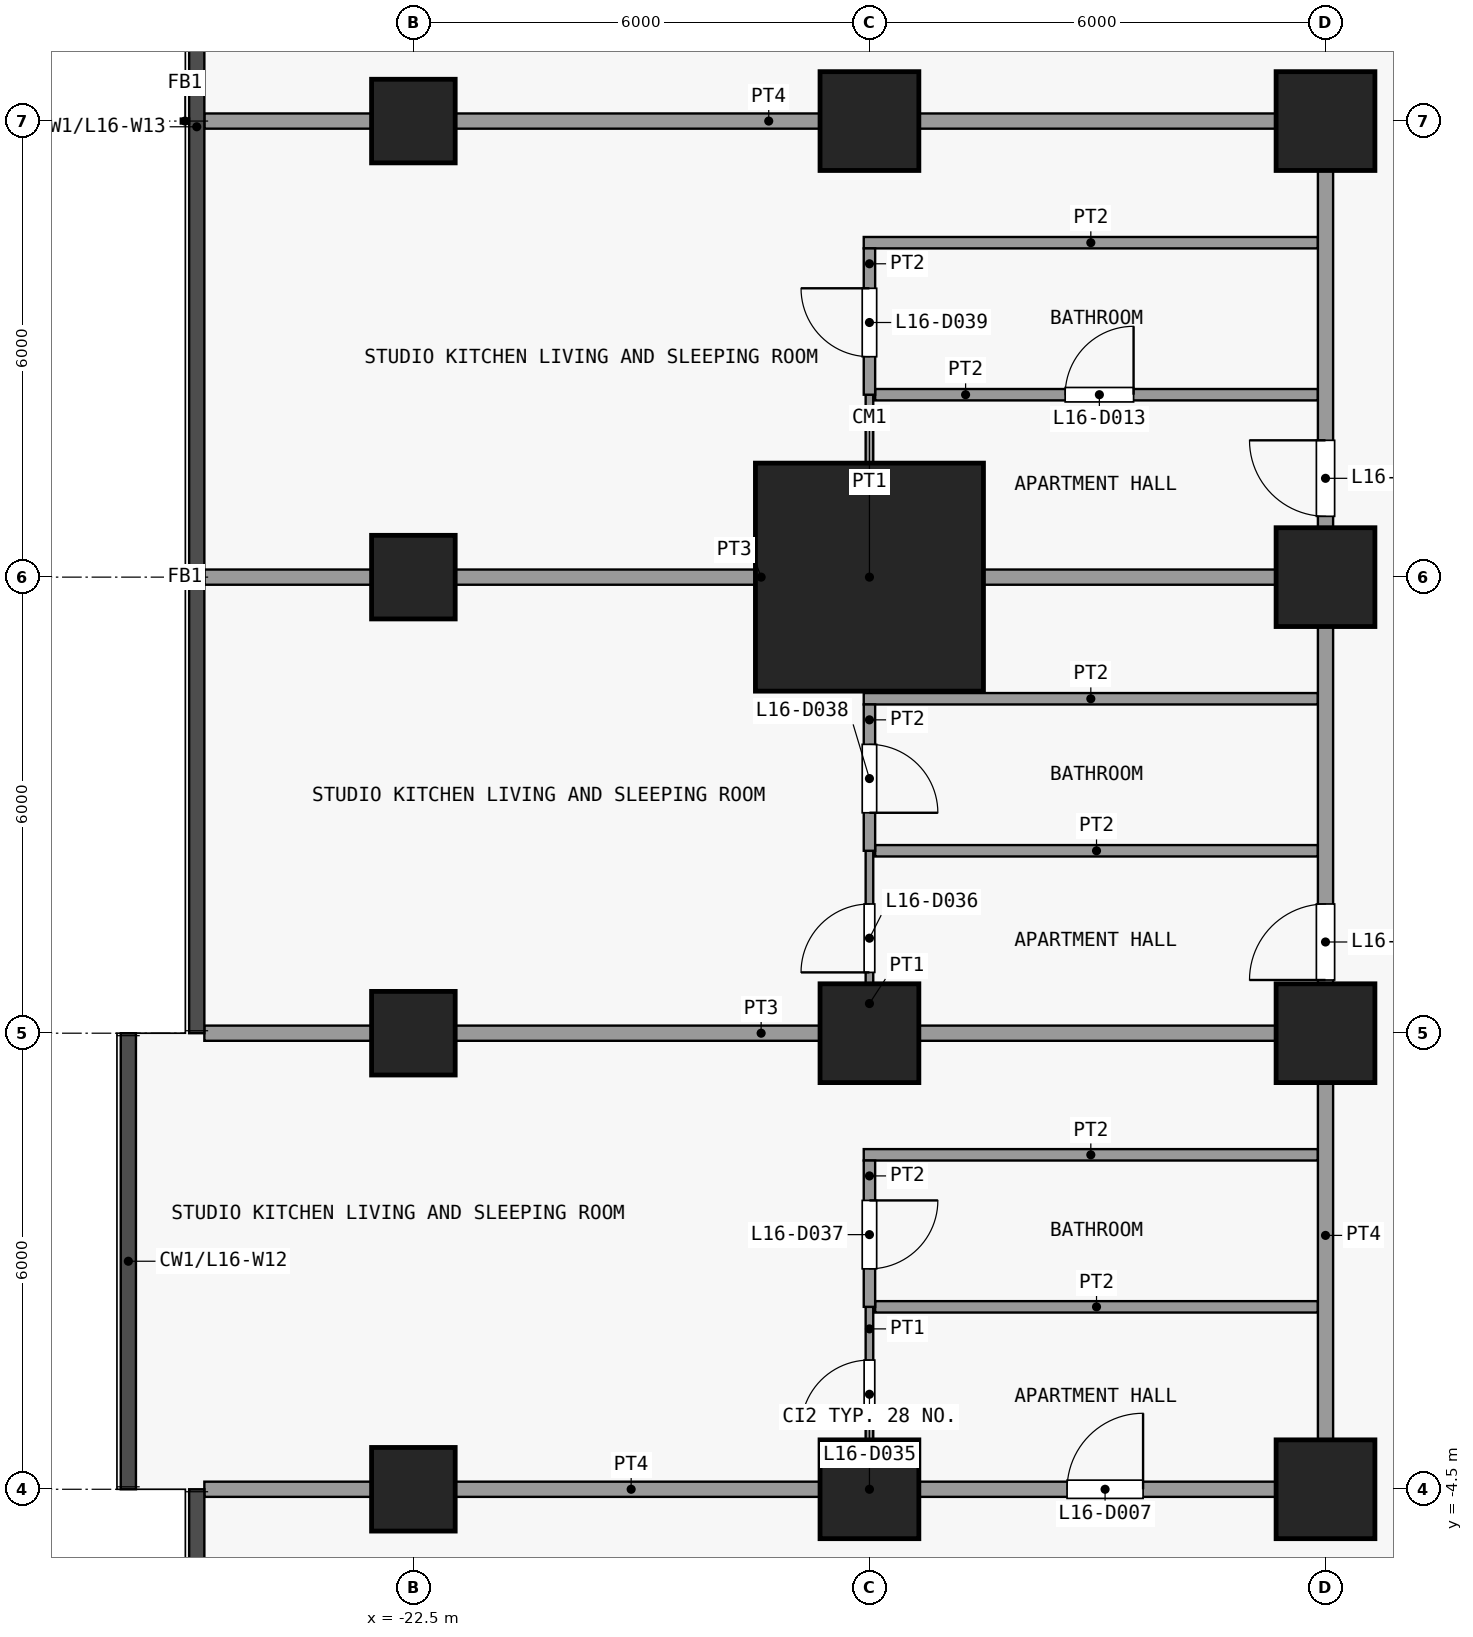
"""IFC4 building model, lengths in metres.
Left out: names, types, materials, properties, quantities, classifications, styles, units other than length and angle.
Written with IfcOpenShell. Run it as: python <this file> out.ifc"""

import sys

from ifc_helpers import new_model, si_unit, direction, frame, frame_2d, origin, origin_2d, place, context, subcontext, project, spatial, rectangle, extrude, element, fill, save


model = new_model("IFC4")
c1 = context("Model", 3, precision=1e-05, world=origin(), true_north=direction((0.0, 1.0)))
c2 = subcontext(c1, "Body", "Model", "MODEL_VIEW")
j1 = project(units=[si_unit("LENGTHUNIT", "METRE"), si_unit("PLANEANGLEUNIT", "RADIAN")], contexts=[c1])
p1 = place(None, origin())
s1 = spatial("IfcSite", under=j1, at=p1, CompositionType="ELEMENT")
p2 = place(p1, origin())
s2 = spatial("IfcBuilding", under=s1, at=p2, CompositionType="ELEMENT")
p3 = place(p2, frame((0.0, 0.0, 68.5)))
s3 = spatial("IfcBuildingStorey", under=s2, at=p3, CompositionType="ELEMENT", Elevation=68.5)
for number, where, z_axis, x_axis in (
    (1, (-22.5, -4.5, 0.0), (0.0, 0.0, 1.0), (1.0, 0.0, 0.0)),
    (2, (-22.5, 1.5, 0.0), (0.0, 0.0, 1.0), (1.0, 0.0, 0.0)),
    (3, (-22.5, 7.5, 0.0), (0.0, 0.0, 1.0), (1.0, 0.0, 0.0)),
    (4, (-22.5, 13.5, 0.0), (0.0, 0.0, 1.0), (1.0, 0.0, 0.0)),
):
    element("IfcColumn", number, at=place(p3, frame(where, z_axis=z_axis, x_axis=x_axis)), inside=s3, PredefinedType="COLUMN", context=c2, shape_type="SweptSolid", body=[
        extrude(rectangle(XDim=1.1, YDim=1.1, at=origin_2d()), origin(), (0.0, 0.0, 1.0), 3.6),
    ])
for number, where, z_axis, x_axis in (
    (5, (-16.5, -4.5, 0.0), (0.0, 0.0, 1.0), (1.0, 0.0, 0.0)),
    (6, (-16.5, 1.5, 0.0), (0.0, 0.0, 1.0), (1.0, 0.0, 0.0)),
):
    element("IfcColumn", number, at=place(p3, frame(where, z_axis=z_axis, x_axis=x_axis)), inside=s3, PredefinedType="COLUMN", context=c2, shape_type="SweptSolid", body=[
        extrude(rectangle(XDim=1.3, YDim=1.3, at=origin_2d()), origin(), (0.0, 0.0, 1.0), 3.6),
    ])
p4 = place(p3, frame((-16.5, 7.5, 0.0), z_axis=(0.0, 0.0, 1.0), x_axis=(1.0, 0.0, 0.0)))
e7 = element("IfcColumn", 7, at=p4, inside=s3, PredefinedType="COLUMN", context=c2, shape_type="SweptSolid", body=[
    extrude(rectangle(XDim=3.0, YDim=3.0, at=origin_2d()), origin(), (0.0, 0.0, 1.0), 3.6),
])
for number, where, z_axis, x_axis in (
    (8, (-16.5, 13.5, 0.0), (0.0, 0.0, 1.0), (1.0, 0.0, 0.0)),
    (9, (-10.5, -4.5, 0.0), (0.0, 0.0, 1.0), (1.0, 0.0, 0.0)),
    (10, (-10.5, 1.5, 0.0), (0.0, 0.0, 1.0), (1.0, 0.0, 0.0)),
    (11, (-10.5, 7.5, 0.0), (0.0, 0.0, 1.0), (1.0, 0.0, 0.0)),
    (12, (-10.5, 13.5, 0.0), (0.0, 0.0, 1.0), (1.0, 0.0, 0.0)),
):
    element("IfcColumn", number, at=place(p3, frame(where, z_axis=z_axis, x_axis=x_axis)), inside=s3, PredefinedType="COLUMN", context=c2, shape_type="SweptSolid", body=[
        extrude(rectangle(XDim=1.3, YDim=1.3, at=origin_2d()), origin(), (0.0, 0.0, 1.0), 3.6),
    ])
p5 = place(p3, frame((-25.25, -4.5, 0.0), z_axis=(0.0, 0.0, 1.0), x_axis=(1.0, 0.0, 0.0)))
e13 = element("IfcWall", 13, at=p5, inside=s3, PredefinedType="PARTITIONING", context=c2, shape_type="SweptSolid", body=[
    extrude(rectangle(XDim=14.85, YDim=0.2, at=frame_2d((7.425, 0.0))), origin(), (0.0, 0.0, 1.0), 3.3),
])
p6 = place(p5, frame((11.35, 0.0, 0.0)))
e14 = element("IfcOpeningElement", 14, at=p6, cuts=e13, PredefinedType="OPENING", context=c2, shape_type="SweptSolid", body=[
    extrude(rectangle(XDim=1.0, YDim=2.1, at=frame_2d((0.5, 1.05))), frame((0.0, 0.11, 0.0), z_axis=(0.0, -1.0, 0.0), x_axis=(1.0, 0.0, 0.0)), (0.0, 0.0, 1.0), 0.22),
])
p7 = place(p3, frame((-16.425, -2.1, 0.0), z_axis=(0.0, 0.0, 1.0), x_axis=(1.0, 0.0, 0.0)))
e15 = element("IfcWall", 15, at=p7, inside=s3, PredefinedType="PARTITIONING", context=c2, shape_type="SweptSolid", body=[
    extrude(rectangle(XDim=5.825, YDim=0.15, at=frame_2d((2.913, 0.0))), origin(), (0.0, 0.0, 1.0), 3.3),
])
p8 = place(p3, frame((-16.575, -0.1, 0.0), z_axis=(0.0, 0.0, 1.0), x_axis=(1.0, 0.0, 0.0)))
e16 = element("IfcWall", 16, at=p8, inside=s3, PredefinedType="PARTITIONING", context=c2, shape_type="SweptSolid", body=[
    extrude(rectangle(XDim=5.975, YDim=0.15, at=frame_2d((2.987, 0.0))), origin(), (0.0, 0.0, 1.0), 3.3),
])
p9 = place(p3, frame((-25.25, 1.5, 0.0), z_axis=(0.0, 0.0, 1.0), x_axis=(1.0, 0.0, 0.0)))
e17 = element("IfcWall", 17, at=p9, inside=s3, PredefinedType="PARTITIONING", context=c2, shape_type="SweptSolid", body=[
    extrude(rectangle(XDim=14.65, YDim=0.2, at=frame_2d((7.325, 0.0))), origin(), (0.0, 0.0, 1.0), 3.3),
])
p10 = place(p3, frame((-16.425, 3.9, 0.0), z_axis=(0.0, 0.0, 1.0), x_axis=(1.0, 0.0, 0.0)))
e18 = element("IfcWall", 18, at=p10, inside=s3, PredefinedType="PARTITIONING", context=c2, shape_type="SweptSolid", body=[
    extrude(rectangle(XDim=5.825, YDim=0.15, at=frame_2d((2.913, 0.0))), origin(), (0.0, 0.0, 1.0), 3.3),
])
p11 = place(p3, frame((-16.575, 5.9, 0.0), z_axis=(0.0, 0.0, 1.0), x_axis=(1.0, 0.0, 0.0)))
e19 = element("IfcWall", 19, at=p11, inside=s3, PredefinedType="PARTITIONING", context=c2, shape_type="SweptSolid", body=[
    extrude(rectangle(XDim=5.975, YDim=0.15, at=frame_2d((2.987, 0.0))), origin(), (0.0, 0.0, 1.0), 3.3),
])
p12 = place(p3, frame((-25.25, 7.5, 0.0), z_axis=(0.0, 0.0, 1.0), x_axis=(1.0, 0.0, 0.0)))
e20 = element("IfcWall", 20, at=p12, inside=s3, PredefinedType="PARTITIONING", context=c2, shape_type="SweptSolid", body=[
    extrude(rectangle(XDim=14.65, YDim=0.2, at=frame_2d((7.325, 0.0))), origin(), (0.0, 0.0, 1.0), 3.3),
])
p13 = place(p3, frame((-16.425, 9.9, 0.0), z_axis=(0.0, 0.0, 1.0), x_axis=(1.0, 0.0, 0.0)))
e21 = element("IfcWall", 21, at=p13, inside=s3, PredefinedType="PARTITIONING", context=c2, shape_type="SweptSolid", body=[
    extrude(rectangle(XDim=5.825, YDim=0.15, at=frame_2d((2.913, 0.0))), origin(), (0.0, 0.0, 1.0), 3.3),
])
p14 = place(p13, frame((2.5, 0.0, 0.0)))
e22 = element("IfcOpeningElement", 22, at=p14, cuts=e21, PredefinedType="OPENING", context=c2, shape_type="SweptSolid", body=[
    extrude(rectangle(XDim=0.9, YDim=2.1, at=frame_2d((0.45, 1.05))), frame((0.0, 0.085, 0.0), z_axis=(0.0, -1.0, 0.0), x_axis=(1.0, 0.0, 0.0)), (0.0, 0.0, 1.0), 0.17),
])
p15 = place(p3, frame((-16.575, 11.9, 0.0), z_axis=(0.0, 0.0, 1.0), x_axis=(1.0, 0.0, 0.0)))
e23 = element("IfcWall", 23, at=p15, inside=s3, PredefinedType="PARTITIONING", context=c2, shape_type="SweptSolid", body=[
    extrude(rectangle(XDim=5.975, YDim=0.15, at=frame_2d((2.987, 0.0))), origin(), (0.0, 0.0, 1.0), 3.3),
])
p16 = place(p3, frame((-25.25, 13.5, 0.0), z_axis=(0.0, 0.0, 1.0), x_axis=(1.0, 0.0, 0.0)))
e24 = element("IfcWall", 24, at=p16, inside=s3, PredefinedType="PARTITIONING", context=c2, shape_type="SweptSolid", body=[
    extrude(rectangle(XDim=14.85, YDim=0.2, at=frame_2d((7.425, 0.0))), origin(), (0.0, 0.0, 1.0), 3.3),
])
p17 = place(p3, frame((-16.5, -4.4, 0.0), z_axis=(0.0, 0.0, 1.0), x_axis=(0.0, 1.0, 0.0)))
e25 = element("IfcWall", 25, at=p17, inside=s3, PredefinedType="PARTITIONING", context=c2, shape_type="SweptSolid", body=[
    extrude(rectangle(XDim=2.3, YDim=0.1, at=frame_2d((1.15, 0.0))), origin(), (0.0, 0.0, 1.0), 3.3),
])
p18 = place(p17, frame((0.7, 0.0, 0.0)))
e26 = element("IfcOpeningElement", 26, at=p18, cuts=e25, PredefinedType="OPENING", context=c2, shape_type="SweptSolid", body=[
    extrude(rectangle(XDim=0.9, YDim=2.1, at=frame_2d((0.45, 1.05))), frame((0.0, 0.06, 0.0), z_axis=(0.0, -1.0, 0.0), x_axis=(1.0, 0.0, 0.0)), (0.0, 0.0, 1.0), 0.12),
])
p19 = place(p3, frame((-16.5, 1.6, 0.0), z_axis=(0.0, 0.0, 1.0), x_axis=(0.0, 1.0, 0.0)))
e27 = element("IfcWall", 27, at=p19, inside=s3, PredefinedType="PARTITIONING", context=c2, shape_type="SweptSolid", body=[
    extrude(rectangle(XDim=2.3, YDim=0.1, at=frame_2d((1.15, 0.0))), origin(), (0.0, 0.0, 1.0), 3.3),
])
p20 = place(p19, frame((0.7, 0.0, 0.0)))
e28 = element("IfcOpeningElement", 28, at=p20, cuts=e27, PredefinedType="OPENING", context=c2, shape_type="SweptSolid", body=[
    extrude(rectangle(XDim=0.9, YDim=2.1, at=frame_2d((0.45, 1.05))), frame((0.0, 0.06, 0.0), z_axis=(0.0, -1.0, 0.0), x_axis=(1.0, 0.0, 0.0)), (0.0, 0.0, 1.0), 0.12),
])
p21 = place(p3, frame((-16.5, 7.6, 0.0), z_axis=(0.0, 0.0, 1.0), x_axis=(0.0, 1.0, 0.0)))
e29 = element("IfcWall", 29, at=p21, inside=s3, PredefinedType="PARTITIONING", context=c2, shape_type="SweptSolid", body=[
    extrude(rectangle(XDim=2.3, YDim=0.1, at=frame_2d((1.15, 0.0))), origin(), (0.0, 0.0, 1.0), 3.3),
])
p22 = place(p3, frame((-16.5, -2.1, 0.0), z_axis=(0.0, 0.0, 1.0), x_axis=(0.0, 1.0, 0.0)))
e30 = element("IfcWall", 30, at=p22, inside=s3, PredefinedType="PARTITIONING", context=c2, shape_type="SweptSolid", body=[
    extrude(rectangle(XDim=1.925, YDim=0.15, at=frame_2d((0.962, 0.0))), origin(), (0.0, 0.0, 1.0), 3.3),
])
p23 = place(p22, frame((0.5, 0.0, 0.0)))
e31 = element("IfcOpeningElement", 31, at=p23, cuts=e30, PredefinedType="OPENING", context=c2, shape_type="SweptSolid", body=[
    extrude(rectangle(XDim=0.9, YDim=2.1, at=frame_2d((0.45, 1.05))), frame((0.0, 0.085, 0.0), z_axis=(0.0, -1.0, 0.0), x_axis=(1.0, 0.0, 0.0)), (0.0, 0.0, 1.0), 0.17),
])
p24 = place(p3, frame((-16.5, 3.9, 0.0), z_axis=(0.0, 0.0, 1.0), x_axis=(0.0, 1.0, 0.0)))
e32 = element("IfcWall", 32, at=p24, inside=s3, PredefinedType="PARTITIONING", context=c2, shape_type="SweptSolid", body=[
    extrude(rectangle(XDim=1.925, YDim=0.15, at=frame_2d((0.962, 0.0))), origin(), (0.0, 0.0, 1.0), 3.3),
])
p25 = place(p24, frame((0.5, 0.0, 0.0)))
e33 = element("IfcOpeningElement", 33, at=p25, cuts=e32, PredefinedType="OPENING", context=c2, shape_type="SweptSolid", body=[
    extrude(rectangle(XDim=0.9, YDim=2.1, at=frame_2d((0.45, 1.05))), frame((0.0, 0.085, 0.0), z_axis=(0.0, -1.0, 0.0), x_axis=(1.0, 0.0, 0.0)), (0.0, 0.0, 1.0), 0.17),
])
p26 = place(p3, frame((-16.5, 9.9, 0.0), z_axis=(0.0, 0.0, 1.0), x_axis=(0.0, 1.0, 0.0)))
e34 = element("IfcWall", 34, at=p26, inside=s3, PredefinedType="PARTITIONING", context=c2, shape_type="SweptSolid", body=[
    extrude(rectangle(XDim=1.925, YDim=0.15, at=frame_2d((0.962, 0.0))), origin(), (0.0, 0.0, 1.0), 3.3),
])
p27 = place(p26, frame((0.5, 0.0, 0.0)))
e35 = element("IfcOpeningElement", 35, at=p27, cuts=e34, PredefinedType="OPENING", context=c2, shape_type="SweptSolid", body=[
    extrude(rectangle(XDim=0.9, YDim=2.1, at=frame_2d((0.45, 1.05))), frame((0.0, 0.085, 0.0), z_axis=(0.0, -1.0, 0.0), x_axis=(1.0, 0.0, 0.0)), (0.0, 0.0, 1.0), 0.17),
])
p28 = place(p3, frame((-10.5, -4.4, 0.0), z_axis=(0.0, 0.0, 1.0), x_axis=(0.0, 1.0, 0.0)))
e36 = element("IfcWall", 36, at=p28, inside=s3, PredefinedType="PARTITIONING", context=c2, shape_type="SweptSolid", body=[
    extrude(rectangle(XDim=17.8, YDim=0.2, at=frame_2d((8.9, 0.0))), origin(), (0.0, 0.0, 1.0), 3.3),
])
p29 = place(p28, frame((6.6, 0.0, 0.0)))
e37 = element("IfcOpeningElement", 37, at=p29, cuts=e36, PredefinedType="OPENING", context=c2, shape_type="SweptSolid", body=[
    extrude(rectangle(XDim=1.0, YDim=2.1, at=frame_2d((0.5, 1.05))), frame((0.0, 0.11, 0.0), z_axis=(0.0, -1.0, 0.0), x_axis=(1.0, 0.0, 0.0)), (0.0, 0.0, 1.0), 0.22),
])
p30 = place(p28, frame((12.7, 0.0, 0.0)))
e38 = element("IfcOpeningElement", 38, at=p30, cuts=e36, PredefinedType="OPENING", context=c2, shape_type="SweptSolid", body=[
    extrude(rectangle(XDim=1.0, YDim=2.1, at=frame_2d((0.5, 1.05))), frame((0.0, 0.11, 0.0), z_axis=(0.0, -1.0, 0.0), x_axis=(1.0, 0.0, 0.0)), (0.0, 0.0, 1.0), 0.22),
])
p31 = place(p6, origin())
e39 = element("IfcDoor", 39, at=p31, inside=s3, OperationType="SINGLE_SWING_LEFT", PredefinedType="DOOR", context=c2, shape_type="SweptSolid", body=[
    extrude(rectangle(XDim=1.0, YDim=2.1, at=frame_2d((0.5, 1.05))), frame((0.0, 0.025, 0.0), z_axis=(0.0, -1.0, 0.0), x_axis=(1.0, 0.0, 0.0)), (0.0, 0.0, 1.0), 0.05),
])
fill(e14, e39)
p32 = place(p14, origin())
e40 = element("IfcDoor", 40, at=p32, inside=s3, OperationType="SINGLE_SWING_LEFT", PredefinedType="DOOR", context=c2, shape_type="SweptSolid", body=[
    extrude(rectangle(XDim=0.9, YDim=2.1, at=frame_2d((0.45, 1.05))), frame((0.0, 0.025, 0.0), z_axis=(0.0, -1.0, 0.0), x_axis=(1.0, 0.0, 0.0)), (0.0, 0.0, 1.0), 0.05),
])
fill(e22, e40)
p33 = place(p18, origin())
e41 = element("IfcDoor", 41, at=p33, inside=s3, OperationType="SINGLE_SWING_RIGHT", PredefinedType="DOOR", context=c2, shape_type="SweptSolid", body=[
    extrude(rectangle(XDim=0.9, YDim=2.1, at=frame_2d((0.45, 1.05))), frame((0.0, 0.025, 0.0), z_axis=(0.0, -1.0, 0.0), x_axis=(1.0, 0.0, 0.0)), (0.0, 0.0, 1.0), 0.05),
])
fill(e26, e41)
p34 = place(p20, origin())
e42 = element("IfcDoor", 42, at=p34, inside=s3, OperationType="SINGLE_SWING_RIGHT", PredefinedType="DOOR", context=c2, shape_type="SweptSolid", body=[
    extrude(rectangle(XDim=0.9, YDim=2.1, at=frame_2d((0.45, 1.05))), frame((0.0, 0.025, 0.0), z_axis=(0.0, -1.0, 0.0), x_axis=(1.0, 0.0, 0.0)), (0.0, 0.0, 1.0), 0.05),
])
fill(e28, e42)
p35 = place(p23, origin())
e43 = element("IfcDoor", 43, at=p35, inside=s3, OperationType="SINGLE_SWING_RIGHT", PredefinedType="DOOR", context=c2, shape_type="SweptSolid", body=[
    extrude(rectangle(XDim=0.9, YDim=2.1, at=frame_2d((0.45, 1.05))), frame((0.0, 0.025, 0.0), z_axis=(0.0, -1.0, 0.0), x_axis=(1.0, 0.0, 0.0)), (0.0, 0.0, 1.0), 0.05),
])
fill(e31, e43)
p36 = place(p25, origin())
e44 = element("IfcDoor", 44, at=p36, inside=s3, OperationType="SINGLE_SWING_LEFT", PredefinedType="DOOR", context=c2, shape_type="SweptSolid", body=[
    extrude(rectangle(XDim=0.9, YDim=2.1, at=frame_2d((0.45, 1.05))), frame((0.0, 0.025, 0.0), z_axis=(0.0, -1.0, 0.0), x_axis=(1.0, 0.0, 0.0)), (0.0, 0.0, 1.0), 0.05),
])
fill(e33, e44)
p37 = place(p27, origin())
e45 = element("IfcDoor", 45, at=p37, inside=s3, OperationType="SINGLE_SWING_LEFT", PredefinedType="DOOR", context=c2, shape_type="SweptSolid", body=[
    extrude(rectangle(XDim=0.9, YDim=2.1, at=frame_2d((0.45, 1.05))), frame((0.0, 0.025, 0.0), z_axis=(0.0, -1.0, 0.0), x_axis=(1.0, 0.0, 0.0)), (0.0, 0.0, 1.0), 0.05),
])
fill(e35, e45)
p38 = place(p29, origin())
e46 = element("IfcDoor", 46, at=p38, inside=s3, OperationType="SINGLE_SWING_RIGHT", PredefinedType="DOOR", context=c2, shape_type="SweptSolid", body=[
    extrude(rectangle(XDim=1.0, YDim=2.1, at=frame_2d((0.5, 1.05))), frame((0.0, 0.025, 0.0), z_axis=(0.0, -1.0, 0.0), x_axis=(1.0, 0.0, 0.0)), (0.0, 0.0, 1.0), 0.05),
])
fill(e37, e46)
p39 = place(p30, origin())
e47 = element("IfcDoor", 47, at=p39, inside=s3, OperationType="SINGLE_SWING_LEFT", PredefinedType="DOOR", context=c2, shape_type="SweptSolid", body=[
    extrude(rectangle(XDim=1.0, YDim=2.1, at=frame_2d((0.5, 1.05))), frame((0.0, 0.025, 0.0), z_axis=(0.0, -1.0, 0.0), x_axis=(1.0, 0.0, 0.0)), (0.0, 0.0, 1.0), 0.05),
])
fill(e38, e47)
save(model, sys.argv[1])
